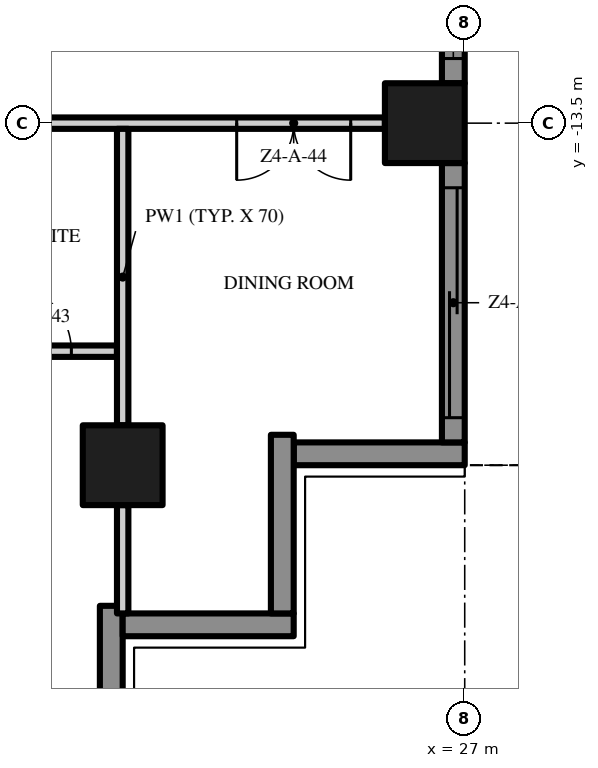
"""IFC4 building model, lengths in metres.
Left out: names, types, materials, properties, quantities, classifications, styles, units other than length and angle.
Written with IfcOpenShell. Run it as: python <this file> out.ifc"""

import sys

from ifc_helpers import new_model, si_unit, direction, frame, frame_2d, origin, origin_2d, place, context, subcontext, project, spatial, polyline, rectangle, outline, extrude, element, fill, save


model = new_model("IFC4")
c1 = context("Model", 3, precision=1e-05, world=origin(), true_north=direction((0.0, 1.0)))
c2 = subcontext(c1, "Body", "Model", "MODEL_VIEW")
j1 = project(units=[si_unit("LENGTHUNIT", "METRE"), si_unit("PLANEANGLEUNIT", "RADIAN")], contexts=[c1])
p1 = place(None, origin())
s1 = spatial("IfcSite", under=j1, at=p1, CompositionType="ELEMENT")
p2 = place(p1, origin())
s2 = spatial("IfcBuilding", under=s1, at=p2, CompositionType="ELEMENT")
p3 = place(p2, frame((0.0, 0.0, 188.2)))
s3 = spatial("IfcBuildingStorey", under=s2, at=p3, CompositionType="ELEMENT", Elevation=188.2)
for number, where, z_axis, x_axis in (
    (1, (26.475, -13.5, 0.0), (0.0, 0.0, 1.0), (1.0, 0.0, 0.0)),
    (2, (22.5, -18.0, 0.0), (0.0, 0.0, 1.0), (1.0, 0.0, 0.0)),
):
    element("IfcColumn", number, at=place(p3, frame(where, z_axis=z_axis, x_axis=x_axis)), inside=s3, PredefinedType="COLUMN", context=c2, shape_type="SweptSolid", body=[
        extrude(rectangle(XDim=1.05, YDim=1.05, at=origin_2d()), origin(), (0.0, 0.0, 1.0), 3.5),
    ])
p4 = place(p3, frame((22.35, -19.85, 0.0), z_axis=(0.0, 0.0, 1.0), x_axis=(0.0, -1.0, 0.0)))
e3 = element("IfcWall", 3, at=p4, inside=s3, PredefinedType="SOLIDWALL", context=c2, shape_type="SweptSolid", body=[
    extrude(rectangle(XDim=2.35, YDim=0.3, at=frame_2d((1.175, 0.0))), origin(), (0.0, 0.0, 1.0), 3.5),
])
p5 = place(p3, frame((24.75, -20.1, 0.0), z_axis=(0.0, 0.0, 1.0), x_axis=(-1.0, 0.0, 0.0)))
e4 = element("IfcWall", 4, at=p5, inside=s3, PredefinedType="SOLIDWALL", context=c2, shape_type="SweptSolid", body=[
    extrude(rectangle(XDim=2.25, YDim=0.3, at=frame_2d((1.125, 0.0))), origin(), (0.0, 0.0, 1.0), 3.5),
])
p6 = place(p3, frame((24.6, -17.6, 0.0), z_axis=(0.0, 0.0, 1.0), x_axis=(0.0, -1.0, 0.0)))
e5 = element("IfcWall", 5, at=p6, inside=s3, PredefinedType="SOLIDWALL", context=c2, shape_type="SweptSolid", body=[
    extrude(rectangle(XDim=2.35, YDim=0.3, at=frame_2d((1.175, 0.0))), origin(), (0.0, 0.0, 1.0), 3.5),
])
p7 = place(p3, frame((27.0, -17.85, 0.0), z_axis=(0.0, 0.0, 1.0), x_axis=(-1.0, 0.0, 0.0)))
e6 = element("IfcWall", 6, at=p7, inside=s3, PredefinedType="SOLIDWALL", context=c2, shape_type="SweptSolid", body=[
    extrude(rectangle(XDim=2.25, YDim=0.3, at=frame_2d((1.125, 0.0))), origin(), (0.0, 0.0, 1.0), 3.5),
])
p8 = place(p3, frame((26.85, -14.025, 0.0), z_axis=(0.0, 0.0, 1.0), x_axis=(0.0, -1.0, 0.0)))
e7 = element("IfcWall", 7, at=p8, inside=s3, PredefinedType="SOLIDWALL", context=c2, shape_type="SweptSolid", body=[
    extrude(rectangle(XDim=3.675, YDim=0.3, at=frame_2d((1.837, 0.0))), origin(), (0.0, 0.0, 1.0), 3.5),
])
p9 = place(p8, frame((0.325, 0.0, 0.0)))
e8 = element("IfcOpeningElement", 8, at=p9, cuts=e7, PredefinedType="OPENING", context=c2, shape_type="SweptSolid", body=[
    extrude(rectangle(XDim=3.025, YDim=2.4, at=frame_2d((1.512, 1.2))), frame((0.0, 0.16, 0.0), z_axis=(0.0, -1.0, 0.0), x_axis=(1.0, 0.0, 0.0)), (0.0, 0.0, 1.0), 0.32),
])
p10 = place(p3, frame((26.85, -5.025, 0.0), z_axis=(0.0, 0.0, 1.0), x_axis=(0.0, -1.0, 0.0)))
e9 = element("IfcWall", 9, at=p10, inside=s3, PredefinedType="SOLIDWALL", context=c2, shape_type="SweptSolid", body=[
    extrude(rectangle(XDim=7.95, YDim=0.3, at=frame_2d((3.975, 0.0))), origin(), (0.0, 0.0, 1.0), 3.5),
])
p11 = place(p10, frame((4.6, 0.0, 0.45)))
e10 = element("IfcOpeningElement", 10, at=p11, cuts=e9, PredefinedType="OPENING", context=c2, shape_type="SweptSolid", body=[
    extrude(rectangle(XDim=3.025, YDim=2.65, at=frame_2d((1.512, 1.325))), frame((0.0, 0.16, 0.0), z_axis=(0.0, -1.0, 0.0), x_axis=(1.0, 0.0, 0.0)), (0.0, 0.0, 1.0), 0.32),
])
p12 = place(p10, frame((0.325, 0.0, 0.45)))
e11 = element("IfcOpeningElement", 11, at=p12, cuts=e9, PredefinedType="OPENING", context=c2, shape_type="SweptSolid", body=[
    extrude(rectangle(XDim=3.025, YDim=2.65, at=frame_2d((1.512, 1.325))), frame((0.0, 0.16, 0.0), z_axis=(0.0, -1.0, 0.0), x_axis=(1.0, 0.0, 0.0)), (0.0, 0.0, 1.0), 0.32),
])
p13 = place(p3, origin())
e12 = element("IfcWall", 12, at=p13, inside=s3, PredefinedType="USERDEFINED", context=c2, shape_type="SweptSolid", body=[
    extrude(outline(polyline([(30.0, -18.0), (29.771, -16.5), (29.171, -15.0), (28.429, -13.5), (27.829, -12.0), (27.6, -10.5), (27.829, -9.0), (28.429, -7.5), (29.171, -6.0), (29.771, -4.5), (30.0, -3.0), (29.771, -1.5), (29.171, 0.0), (28.429, 1.5), (27.829, 3.0), (27.6, 4.5), (27.829, 6.0), (28.429, 7.5), (29.171, 9.0), (29.771, 10.5), (30.0, 12.0), (29.771, 13.5), (29.171, 15.0), (28.429, 16.5), (27.829, 18.0), (27.597, 17.907), (28.201, 16.398), (28.942, 14.898), (29.528, 13.434), (29.747, 12.0), (29.528, 10.566), (28.942, 9.102), (28.201, 7.602), (27.586, 6.066), (27.347, 4.5), (27.586, 2.934), (28.201, 1.398), (28.942, -0.102), (29.528, -1.566), (29.747, -3.0), (29.528, -4.434), (28.942, -5.898), (28.201, -7.398), (27.586, -8.934), (27.347, -10.5), (27.586, -12.066), (28.201, -13.602), (28.942, -15.102), (29.528, -16.566), (29.753, -18.038), (30.0, -18.0)])), origin(), (0.0, 0.0, 1.0), 0.9),
])
p14 = place(p3, frame((20.325, -16.5, 0.0), z_axis=(0.0, 0.0, 1.0), x_axis=(1.0, 0.0, 0.0)))
e13 = element("IfcWall", 13, at=p14, inside=s3, PredefinedType="PARTITIONING", context=c2, shape_type="SweptSolid", body=[
    extrude(rectangle(XDim=2.1, YDim=0.15, at=frame_2d((1.05, 0.0))), origin(), (0.0, 0.0, 1.0), 3.5),
])
p15 = place(p14, frame((0.6, 0.0, 0.0)))
e14 = element("IfcOpeningElement", 14, at=p15, cuts=e13, PredefinedType="OPENING", context=c2, shape_type="SweptSolid", body=[
    extrude(rectangle(XDim=0.9, YDim=2.1, at=frame_2d((0.45, 1.05))), frame((0.0, 0.085, 0.0), z_axis=(0.0, -1.0, 0.0), x_axis=(1.0, 0.0, 0.0)), (0.0, 0.0, 1.0), 0.17),
])
p16 = place(p3, frame((25.95, -13.5, 0.0), z_axis=(0.0, 0.0, 1.0), x_axis=(-1.0, 0.0, 0.0)))
e15 = element("IfcWall", 15, at=p16, inside=s3, PredefinedType="PARTITIONING", context=c2, shape_type="SweptSolid", body=[
    extrude(rectangle(XDim=7.375, YDim=0.15, at=frame_2d((3.688, 0.0))), origin(), (0.0, 0.0, 1.0), 3.5),
])
p17 = place(p16, frame((6.225, 0.0, 0.0)))
e16 = element("IfcOpeningElement", 16, at=p17, cuts=e15, PredefinedType="OPENING", context=c2, shape_type="SweptSolid", body=[
    extrude(rectangle(XDim=1.0, YDim=2.4, at=frame_2d((0.5, 1.2))), frame((0.0, 0.085, 0.0), z_axis=(0.0, -1.0, 0.0), x_axis=(1.0, 0.0, 0.0)), (0.0, 0.0, 1.0), 0.17),
])
p18 = place(p16, frame((0.45, 0.0, 0.0)))
e17 = element("IfcOpeningElement", 17, at=p18, cuts=e15, PredefinedType="OPENING", context=c2, shape_type="SweptSolid", body=[
    extrude(rectangle(XDim=1.5, YDim=2.4, at=frame_2d((0.75, 1.2))), frame((0.0, 0.085, 0.0), z_axis=(0.0, -1.0, 0.0), x_axis=(1.0, 0.0, 0.0)), (0.0, 0.0, 1.0), 0.17),
])
p19 = place(p3, frame((22.5, -19.95, 0.0), z_axis=(0.0, 0.0, 1.0), x_axis=(0.0, 1.0, 0.0)))
e18 = element("IfcWall", 18, at=p19, inside=s3, PredefinedType="PARTITIONING", context=c2, shape_type="SweptSolid", body=[
    extrude(rectangle(XDim=1.425, YDim=0.15, at=frame_2d((0.713, 0.0))), origin(), (0.0, 0.0, 1.0), 3.5),
])
p20 = place(p3, frame((22.5, -17.475, 0.0), z_axis=(0.0, 0.0, 1.0), x_axis=(0.0, 1.0, 0.0)))
e19 = element("IfcWall", 19, at=p20, inside=s3, PredefinedType="PARTITIONING", context=c2, shape_type="SweptSolid", body=[
    extrude(rectangle(XDim=3.9, YDim=0.15, at=frame_2d((1.95, 0.0))), origin(), (0.0, 0.0, 1.0), 3.5),
])
p21 = place(p9, origin())
e20 = element("IfcDoor", 20, at=p21, inside=s3, OperationType="SINGLE_SWING_LEFT", PredefinedType="DOOR", context=c2, shape_type="SweptSolid", body=[
    extrude(rectangle(XDim=3.025, YDim=2.4, at=frame_2d((1.512, 1.2))), frame((0.0, 0.025, 0.0), z_axis=(0.0, -1.0, 0.0), x_axis=(1.0, 0.0, 0.0)), (0.0, 0.0, 1.0), 0.05),
])
fill(e8, e20)
p22 = place(p11, origin())
e21 = element("IfcWindow", 21, at=p22, inside=s3, PartitioningType="SINGLE_PANEL", PredefinedType="WINDOW", context=c2, shape_type="SweptSolid", body=[
    extrude(rectangle(XDim=3.025, YDim=2.65, at=frame_2d((1.512, 1.325))), frame((0.0, 0.03, 0.0), z_axis=(0.0, -1.0, 0.0), x_axis=(1.0, 0.0, 0.0)), (0.0, 0.0, 1.0), 0.06),
])
fill(e10, e21)
p23 = place(p15, origin())
e22 = element("IfcDoor", 22, at=p23, inside=s3, OperationType="SINGLE_SWING_LEFT", PredefinedType="DOOR", context=c2, shape_type="SweptSolid", body=[
    extrude(rectangle(XDim=0.9, YDim=2.1, at=frame_2d((0.45, 1.05))), frame((0.0, 0.025, 0.0), z_axis=(0.0, -1.0, 0.0), x_axis=(1.0, 0.0, 0.0)), (0.0, 0.0, 1.0), 0.05),
])
fill(e14, e22)
p24 = place(p18, origin())
e23 = element("IfcDoor", 23, at=p24, inside=s3, OperationType="DOUBLE_DOOR_SINGLE_SWING", PredefinedType="DOOR", context=c2, shape_type="SweptSolid", body=[
    extrude(rectangle(XDim=1.5, YDim=2.4, at=frame_2d((0.75, 1.2))), frame((0.0, 0.025, 0.0), z_axis=(0.0, -1.0, 0.0), x_axis=(1.0, 0.0, 0.0)), (0.0, 0.0, 1.0), 0.05),
])
fill(e17, e23)
save(model, sys.argv[1])
